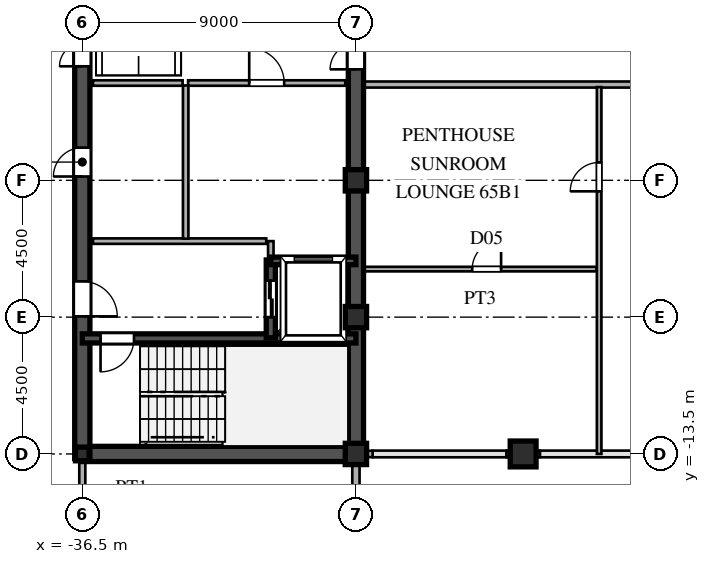
"""IFC4 building model, lengths in metres.
Left out: names, types, materials, properties, quantities, classifications, styles, units other than length and angle.
Written with IfcOpenShell. Run it as: python <this file> out.ifc"""

import sys

from ifc_helpers import new_model, si_unit, direction, frame, frame_2d, origin, origin_2d, place, context, subcontext, project, spatial, rectangle, hollow_rectangle, i_section, extrude, source, transform, mapped, element, fill, save


model = new_model("IFC4")
c1 = context("Model", 3, precision=1e-05, world=origin(), true_north=direction((0.0, 1.0)))
c2 = subcontext(c1, "Body", "Model", "MODEL_VIEW")
j1 = project(units=[si_unit("LENGTHUNIT", "METRE"), si_unit("PLANEANGLEUNIT", "RADIAN")], contexts=[c1])
p1 = place(None, origin())
s1 = spatial("IfcSite", under=j1, at=p1, CompositionType="ELEMENT")
p2 = place(p1, origin())
s2 = spatial("IfcBuilding", under=s1, at=p2, CompositionType="ELEMENT")
p3 = place(p2, frame((0.0, 0.0, 246.9)))
s3 = spatial("IfcBuildingStorey", under=s2, at=p3, CompositionType="ELEMENT", Elevation=246.9)
m1 = source(origin(), c2, "Body", "SweptSolid", [
    extrude(hollow_rectangle(XDim=0.7, YDim=0.7, WallThickness=0.03, at=origin_2d()), origin(), (0.0, 0.0, 1.0), 3.75),
])
for number, where, z_axis, x_axis in (
    (1, (-27.5, -13.5, 0.0), (0.0, 0.0, 1.0), (1.0, 0.0, 0.0)),
    (2, (-27.5, -9.0, 0.0), (0.0, 0.0, 1.0), (1.0, 0.0, 0.0)),
    (3, (-27.5, -4.5, 0.0), (0.0, 0.0, 1.0), (1.0, 0.0, 0.0)),
):
    element("IfcColumn", number, at=place(p3, frame(where, z_axis=z_axis, x_axis=x_axis)), inside=s3, PredefinedType="COLUMN", context=c2, shape_type="MappedRepresentation", body=[
        mapped(m1, transform((0.0, 0.0, 0.0), scale=1.0)),
    ])
m2 = source(origin(), c2, "Body", "SweptSolid", [
    extrude(i_section(OverallWidth=0.45, OverallDepth=0.45, WebThickness=0.016, FlangeThickness=0.025, at=origin_2d()), origin(), (0.0, 0.0, 1.0), 3.75),
])
p4 = place(p3, frame((-36.5, -13.5, 0.0), z_axis=(0.0, 0.0, 1.0), x_axis=(1.0, 0.0, 0.0)))
e4 = element("IfcColumn", 4, at=p4, inside=s3, PredefinedType="COLUMN", context=c2, shape_type="MappedRepresentation", body=[
    mapped(m2, transform((0.0, 0.0, 0.0), scale=1.0)),
])
m3 = source(origin(), c2, "Body", "SweptSolid", [
    extrude(hollow_rectangle(XDim=0.85, YDim=0.85, WallThickness=0.036, at=origin_2d()), origin(), (0.0, 0.0, 1.0), 3.75),
])
p5 = place(p3, frame((-22.0, -13.5, 0.0), z_axis=(0.0, 0.0, 1.0), x_axis=(1.0, 0.0, 0.0)))
e5 = element("IfcColumn", 5, at=p5, inside=s3, PredefinedType="COLUMN", context=c2, shape_type="MappedRepresentation", body=[
    mapped(m3, transform((0.0, 0.0, 0.0), scale=1.0)),
])
p6 = place(p3, frame((-27.5, -15.98, 0.0), z_axis=(0.0, 0.0, 1.0), x_axis=(0.0, 1.0, 0.0)))
e6 = element("IfcWall", 6, at=p6, inside=s3, PredefinedType="SOLIDWALL", context=c2, shape_type="SweptSolid", body=[
    extrude(rectangle(XDim=1.605, YDim=0.24, at=frame_2d((0.803, 0.0))), origin(), (0.0, 0.0, 1.0), 3.53),
])
p7 = place(p3, frame((-27.5, -14.375, 0.0), z_axis=(0.0, 0.0, 1.0), x_axis=(0.0, 1.0, 0.0)))
e7 = element("IfcWall", 7, at=p7, inside=s3, PredefinedType="SOLIDWALL", context=c2, shape_type="SweptSolid", body=[
    extrude(rectangle(XDim=0.62, YDim=0.24, at=frame_2d((0.31, 0.0))), origin(), (0.0, 0.0, 1.0), 3.03),
])
p8 = place(p3, frame((-27.49, -13.5, 0.0), z_axis=(0.0, 0.0, 1.0), x_axis=(1.0, 0.0, 0.0)))
e8 = element("IfcWall", 8, at=p8, inside=s3, PredefinedType="SOLIDWALL", context=c2, shape_type="SweptSolid", body=[
    extrude(rectangle(XDim=0.54, YDim=0.21, at=frame_2d((0.27, 0.0))), origin(), (0.0, 0.0, 1.0), 3.03),
])
p9 = place(p3, frame((-22.55, -13.5, 0.0), z_axis=(0.0, 0.0, 1.0), x_axis=(1.0, 0.0, 0.0)))
e9 = element("IfcWall", 9, at=p9, inside=s3, PredefinedType="SOLIDWALL", context=c2, shape_type="SweptSolid", body=[
    extrude(rectangle(XDim=1.1, YDim=0.21, at=frame_2d((0.55, 0.0))), origin(), (0.0, 0.0, 1.0), 3.03),
])
p10 = place(p3, frame((-27.5, -13.5, 0.0), z_axis=(0.0, 0.0, 1.0), x_axis=(0.0, 1.0, 0.0)))
e10 = element("IfcWall", 10, at=p10, inside=s3, PredefinedType="SHEAR", context=c2, shape_type="SweptSolid", body=[
    extrude(rectangle(XDim=12.2, YDim=0.5, at=frame_2d((6.1, 0.0))), origin(), (0.0, 0.0, 1.0), 3.53),
])
p11 = place(p3, frame((-27.5, -1.3, 0.0), z_axis=(0.0, 0.0, 1.0), x_axis=(0.0, 1.0, 0.0)))
e11 = element("IfcWall", 11, at=p11, inside=s3, PredefinedType="SHEAR", context=c2, shape_type="SweptSolid", body=[
    extrude(rectangle(XDim=2.6, YDim=0.5, at=frame_2d((1.3, 0.0))), origin(), (0.0, 0.0, 1.0), 3.53),
])
p12 = place(p11, frame((0.45, 0.0, 0.0)))
e12 = element("IfcOpeningElement", 12, at=p12, cuts=e11, PredefinedType="OPENING", context=c2, shape_type="SweptSolid", body=[
    extrude(rectangle(XDim=1.7, YDim=2.35, at=frame_2d((0.85, 1.175))), frame((0.0, 0.26, 0.0), z_axis=(0.0, -1.0, 0.0), x_axis=(1.0, 0.0, 0.0)), (0.0, 0.0, 1.0), 0.52),
])
p13 = place(p3, frame((-36.5, -13.5, 0.0), z_axis=(0.0, 0.0, 1.0), x_axis=(1.0, 0.0, 0.0)))
e13 = element("IfcWall", 13, at=p13, inside=s3, PredefinedType="SHEAR", context=c2, shape_type="SweptSolid", body=[
    extrude(rectangle(XDim=9.0, YDim=0.5, at=frame_2d((4.5, 0.0))), origin(), (0.0, 0.0, 1.0), 3.53),
])
p14 = place(p3, frame((-36.5, -13.65, 0.0), z_axis=(0.0, 0.0, 1.0), x_axis=(0.0, 1.0, 0.0)))
e14 = element("IfcWall", 14, at=p14, inside=s3, PredefinedType="SHEAR", context=c2, shape_type="SweptSolid", body=[
    extrude(rectangle(XDim=7.15, YDim=0.5, at=frame_2d((3.575, 0.0))), origin(), (0.0, 0.0, 1.0), 3.53),
])
p15 = place(p14, frame((4.675, 0.0, 0.0)))
e15 = element("IfcOpeningElement", 15, at=p15, cuts=e14, PredefinedType="OPENING", context=c2, shape_type="SweptSolid", body=[
    extrude(rectangle(XDim=1.15, YDim=2.2, at=frame_2d((0.575, 1.1))), frame((0.0, 0.26, 0.0), z_axis=(0.0, -1.0, 0.0), x_axis=(1.0, 0.0, 0.0)), (0.0, 0.0, 1.0), 0.52),
])
p16 = place(p3, frame((-36.5, -1.3, 0.0), z_axis=(0.0, 0.0, 1.0), x_axis=(0.0, 1.0, 0.0)))
e16 = element("IfcWall", 16, at=p16, inside=s3, PredefinedType="SHEAR", context=c2, shape_type="SweptSolid", body=[
    extrude(rectangle(XDim=2.6, YDim=0.5, at=frame_2d((1.3, 0.0))), origin(), (0.0, 0.0, 1.0), 3.53),
])
p17 = place(p16, frame((0.55, 0.0, 0.0)))
e17 = element("IfcOpeningElement", 17, at=p17, cuts=e16, PredefinedType="OPENING", context=c2, shape_type="SweptSolid", body=[
    extrude(rectangle(XDim=1.5, YDim=2.3, at=frame_2d((0.75, 1.15))), frame((0.0, 0.26, 0.0), z_axis=(0.0, -1.0, 0.0), x_axis=(1.0, 0.0, 0.0)), (0.0, 0.0, 1.0), 0.52),
])
p18 = place(p3, frame((-36.5, -6.5, 0.0), z_axis=(0.0, 0.0, 1.0), x_axis=(0.0, 1.0, 0.0)))
e18 = element("IfcWall", 18, at=p18, inside=s3, PredefinedType="SHEAR", context=c2, shape_type="SweptSolid", body=[
    extrude(rectangle(XDim=5.2, YDim=0.5, at=frame_2d((2.6, 0.0))), origin(), (0.0, 0.0, 1.0), 3.53),
])
p19 = place(p18, frame((2.125, 0.0, 0.0)))
e19 = element("IfcOpeningElement", 19, at=p19, cuts=e18, PredefinedType="OPENING", context=c2, shape_type="SweptSolid", body=[
    extrude(rectangle(XDim=0.95, YDim=2.15, at=frame_2d((0.475, 1.075))), frame((0.0, 0.26, 0.0), z_axis=(0.0, -1.0, 0.0), x_axis=(1.0, 0.0, 0.0)), (0.0, 0.0, 1.0), 0.52),
])
p20 = place(p3, frame((-36.5, -9.7, 0.0), z_axis=(0.0, 0.0, 1.0), x_axis=(1.0, 0.0, 0.0)))
e20 = element("IfcWall", 20, at=p20, inside=s3, PredefinedType="SHEAR", context=c2, shape_type="SweptSolid", body=[
    extrude(rectangle(XDim=9.0, YDim=0.3, at=frame_2d((4.5, 0.0))), origin(), (0.0, 0.0, 1.0), 3.53),
])
p21 = place(p20, frame((0.6, 0.0, 0.0)))
e21 = element("IfcOpeningElement", 21, at=p21, cuts=e20, PredefinedType="OPENING", context=c2, shape_type="SweptSolid", body=[
    extrude(rectangle(XDim=1.1, YDim=2.2, at=frame_2d((0.55, 1.1))), frame((0.0, 0.16, 0.0), z_axis=(0.0, -1.0, 0.0), x_axis=(1.0, 0.0, 0.0)), (0.0, 0.0, 1.0), 0.32),
])
p22 = place(p3, frame((-30.3, -7.15, 0.0), z_axis=(0.0, 0.0, 1.0), x_axis=(1.0, 0.0, 0.0)))
e22 = element("IfcWall", 22, at=p22, inside=s3, PredefinedType="SHEAR", context=c2, shape_type="SweptSolid", body=[
    extrude(rectangle(XDim=2.8, YDim=0.25, at=frame_2d((1.4, 0.0))), origin(), (0.0, 0.0, 1.0), 3.53),
])
p23 = place(p3, frame((-30.3, -9.68, 0.0), z_axis=(0.0, 0.0, 1.0), x_axis=(0.0, 1.0, 0.0)))
e23 = element("IfcWall", 23, at=p23, inside=s3, PredefinedType="SHEAR", context=c2, shape_type="SweptSolid", body=[
    extrude(rectangle(XDim=2.56, YDim=0.3, at=frame_2d((1.28, 0.0))), origin(), (0.0, 0.0, 1.0), 3.53),
])
p24 = place(p23, frame((0.68, 0.0, 0.0)))
e24 = element("IfcOpeningElement", 24, at=p24, cuts=e23, PredefinedType="OPENING", context=c2, shape_type="SweptSolid", body=[
    extrude(rectangle(XDim=1.2, YDim=2.25, at=frame_2d((0.6, 1.125))), frame((0.0, 0.16, 0.0), z_axis=(0.0, -1.0, 0.0), x_axis=(1.0, 0.0, 0.0)), (0.0, 0.0, 1.0), 0.32),
])
p25 = place(p3, frame((-36.15, -6.5, 0.0), z_axis=(0.0, 0.0, 1.0), x_axis=(1.0, 0.0, 0.0)))
e25 = element("IfcWall", 25, at=p25, inside=s3, PredefinedType="PARTITIONING", context=c2, shape_type="SweptSolid", body=[
    extrude(rectangle(XDim=5.7, YDim=0.18, at=frame_2d((2.85, 0.0))), origin(), (0.0, 0.0, 1.0), 3.53),
])
p26 = place(p3, frame((-30.3, -7.12, 0.0), z_axis=(0.0, 0.0, 1.0), x_axis=(0.0, 1.0, 0.0)))
e26 = element("IfcWall", 26, at=p26, inside=s3, PredefinedType="PARTITIONING", context=c2, shape_type="SweptSolid", body=[
    extrude(rectangle(XDim=0.62, YDim=0.18, at=frame_2d((0.31, 0.0))), origin(), (0.0, 0.0, 1.0), 3.53),
])
p27 = place(p3, frame((-33.1, -6.42, 0.0), z_axis=(0.0, 0.0, 1.0), x_axis=(0.0, 1.0, 0.0)))
e27 = element("IfcWall", 27, at=p27, inside=s3, PredefinedType="PARTITIONING", context=c2, shape_type="SweptSolid", body=[
    extrude(rectangle(XDim=5.04, YDim=0.18, at=frame_2d((2.52, 0.0))), origin(), (0.0, 0.0, 1.0), 3.53),
])
p28 = place(p3, frame((-33.02, -1.3, 0.0), z_axis=(0.0, 0.0, 1.0), x_axis=(1.0, 0.0, 0.0)))
e28 = element("IfcWall", 28, at=p28, inside=s3, PredefinedType="PARTITIONING", context=c2, shape_type="SweptSolid", body=[
    extrude(rectangle(XDim=5.17, YDim=0.18, at=frame_2d((2.585, 0.0))), origin(), (0.0, 0.0, 1.0), 3.53),
])
p29 = place(p28, frame((2.01, 0.0, 0.0)))
e29 = element("IfcOpeningElement", 29, at=p29, cuts=e28, PredefinedType="OPENING", context=c2, shape_type="SweptSolid", body=[
    extrude(rectangle(XDim=1.15, YDim=2.2, at=frame_2d((0.575, 1.1))), frame((0.0, 0.1, 0.0), z_axis=(0.0, -1.0, 0.0), x_axis=(1.0, 0.0, 0.0)), (0.0, 0.0, 1.0), 0.2),
])
p30 = place(p3, frame((-36.15, -1.3, 0.0), z_axis=(0.0, 0.0, 1.0), x_axis=(1.0, 0.0, 0.0)))
e30 = element("IfcWall", 30, at=p30, inside=s3, PredefinedType="PARTITIONING", context=c2, shape_type="SweptSolid", body=[
    extrude(rectangle(XDim=2.95, YDim=0.18, at=frame_2d((1.475, 0.0))), origin(), (0.0, 0.0, 1.0), 3.53),
])
p31 = place(p3, frame((-27.245, -7.42, 0.0), z_axis=(0.0, 0.0, 1.0), x_axis=(1.0, 0.0, 0.0)))
e31 = element("IfcWall", 31, at=p31, inside=s3, PredefinedType="PARTITIONING", context=c2, shape_type="SweptSolid", body=[
    extrude(rectangle(XDim=7.66, YDim=0.15, at=frame_2d((3.83, 0.0))), origin(), (0.0, 0.0, 1.0), 3.53),
])
p32 = place(p31, frame((3.57, 0.0, 0.0)))
e32 = element("IfcOpeningElement", 32, at=p32, cuts=e31, PredefinedType="OPENING", context=c2, shape_type="SweptSolid", body=[
    extrude(rectangle(XDim=0.95, YDim=2.15, at=frame_2d((0.475, 1.075))), frame((0.0, 0.085, 0.0), z_axis=(0.0, -1.0, 0.0), x_axis=(1.0, 0.0, 0.0)), (0.0, 0.0, 1.0), 0.17),
])
p33 = place(p3, frame((-27.245, -1.35, 0.0), z_axis=(0.0, 0.0, 1.0), x_axis=(1.0, 0.0, 0.0)))
e33 = element("IfcWall", 33, at=p33, inside=s3, PredefinedType="PARTITIONING", context=c2, shape_type="SweptSolid", body=[
    extrude(rectangle(XDim=54.49, YDim=0.2, at=frame_2d((27.245, 0.0))), origin(), (0.0, 0.0, 1.0), 3.53),
])
p34 = place(p33, frame((24.97, 0.0, 0.0)))
e34 = element("IfcOpeningElement", 34, at=p34, cuts=e33, PredefinedType="OPENING", context=c2, shape_type="SweptSolid", body=[
    extrude(rectangle(XDim=1.05, YDim=2.25, at=frame_2d((0.525, 1.125))), frame((0.0, 0.11, 0.0), z_axis=(0.0, -1.0, 0.0), x_axis=(1.0, 0.0, 0.0)), (0.0, 0.0, 1.0), 0.22),
])
p35 = place(p3, frame((-36.5, -15.515, 0.0), z_axis=(0.0, 0.0, 1.0), x_axis=(0.0, 1.0, 0.0)))
e35 = element("IfcWall", 35, at=p35, inside=s3, PredefinedType="PARTITIONING", context=c2, shape_type="SweptSolid", body=[
    extrude(rectangle(XDim=1.76, YDim=0.2, at=frame_2d((0.88, 0.0))), origin(), (0.0, 0.0, 1.0), 2.93),
])
p36 = place(p3, frame((-19.5, -13.5, 0.0), z_axis=(0.0, 0.0, 1.0), x_axis=(0.0, 1.0, 0.0)))
e36 = element("IfcWall", 36, at=p36, inside=s3, PredefinedType="PARTITIONING", context=c2, shape_type="SweptSolid", body=[
    extrude(rectangle(XDim=12.065, YDim=0.15, at=frame_2d((6.032, 0.0))), origin(), (0.0, 0.0, 1.0), 3.53),
])
p37 = place(p36, frame((8.637, 0.0, 0.0)))
e37 = element("IfcOpeningElement", 37, at=p37, cuts=e36, PredefinedType="OPENING", context=c2, shape_type="SweptSolid", body=[
    extrude(rectangle(XDim=0.95, YDim=2.15, at=frame_2d((0.475, 1.075))), frame((0.0, 0.085, 0.0), z_axis=(0.0, -1.0, 0.0), x_axis=(1.0, 0.0, 0.0)), (0.0, 0.0, 1.0), 0.17),
])
m4 = source(origin(), c2, "Body", "SweptSolid", [
    extrude(rectangle(XDim=1.7, YDim=2.35, at=frame_2d((0.85, 1.175))), frame((0.0, 0.025, 0.0), z_axis=(0.0, -1.0, 0.0), x_axis=(1.0, 0.0, 0.0)), (0.0, 0.0, 1.0), 0.05),
])
p38 = place(p12, origin())
e38 = element("IfcDoor", 38, at=p38, inside=s3, OperationType="DOUBLE_SWING_LEFT", PredefinedType="DOOR", context=c2, shape_type="MappedRepresentation", body=[
    mapped(m4, transform((0.0, 0.0, 0.0), scale=1.0)),
])
fill(e12, e38)
m5 = source(origin(), c2, "Body", "SweptSolid", [
    extrude(rectangle(XDim=1.15, YDim=2.2, at=frame_2d((0.575, 1.1))), frame((0.0, 0.025, 0.0), z_axis=(0.0, -1.0, 0.0), x_axis=(1.0, 0.0, 0.0)), (0.0, 0.0, 1.0), 0.05),
])
p39 = place(p15, frame((1.15, 0.0, 0.0), z_axis=(0.0, 0.0, 1.0), x_axis=(-1.0, 0.0, 0.0)))
e39 = element("IfcDoor", 39, at=p39, inside=s3, OperationType="SINGLE_SWING_LEFT", PredefinedType="DOOR", context=c2, shape_type="MappedRepresentation", body=[
    mapped(m5, transform((0.0, 0.0, 0.0), scale=1.0)),
])
fill(e15, e39)
m6 = source(origin(), c2, "Body", "SweptSolid", [
    extrude(rectangle(XDim=1.5, YDim=2.3, at=frame_2d((0.75, 1.15))), frame((0.0, 0.025, 0.0), z_axis=(0.0, -1.0, 0.0), x_axis=(1.0, 0.0, 0.0)), (0.0, 0.0, 1.0), 0.05),
])
p40 = place(p17, origin())
e40 = element("IfcDoor", 40, at=p40, inside=s3, OperationType="DOUBLE_SWING_LEFT", PredefinedType="DOOR", context=c2, shape_type="MappedRepresentation", body=[
    mapped(m6, transform((0.0, 0.0, 0.0), scale=1.0)),
])
fill(e17, e40)
m7 = source(origin(), c2, "Body", "SweptSolid", [
    extrude(rectangle(XDim=0.95, YDim=2.15, at=frame_2d((0.475, 1.075))), frame((0.0, 0.025, 0.0), z_axis=(0.0, -1.0, 0.0), x_axis=(1.0, 0.0, 0.0)), (0.0, 0.0, 1.0), 0.05),
])
p41 = place(p19, origin())
e41 = element("IfcDoor", 41, at=p41, inside=s3, OperationType="SINGLE_SWING_LEFT", PredefinedType="DOOR", context=c2, shape_type="MappedRepresentation", body=[
    mapped(m7, transform((0.0, 0.0, 0.0), scale=1.0)),
])
fill(e19, e41)
m8 = source(origin(), c2, "Body", "SweptSolid", [
    extrude(rectangle(XDim=1.1, YDim=2.2, at=frame_2d((0.55, 1.1))), frame((0.0, 0.025, 0.0), z_axis=(0.0, -1.0, 0.0), x_axis=(1.0, 0.0, 0.0)), (0.0, 0.0, 1.0), 0.05),
])
p42 = place(p21, frame((1.1, 0.0, 0.0), z_axis=(0.0, 0.0, 1.0), x_axis=(-1.0, 0.0, 0.0)))
e42 = element("IfcDoor", 42, at=p42, inside=s3, OperationType="SINGLE_SWING_LEFT", PredefinedType="DOOR", context=c2, shape_type="MappedRepresentation", body=[
    mapped(m8, transform((0.0, 0.0, 0.0), scale=1.0)),
])
fill(e21, e42)
m9 = source(origin(), c2, "Body", "SweptSolid", [
    extrude(rectangle(XDim=1.2, YDim=2.25, at=frame_2d((0.6, 1.125))), frame((0.0, 0.025, 0.0), z_axis=(0.0, -1.0, 0.0), x_axis=(1.0, 0.0, 0.0)), (0.0, 0.0, 1.0), 0.05),
])
p43 = place(p24, origin())
e43 = element("IfcDoor", 43, at=p43, inside=s3, OperationType="DOUBLE_DOOR_SLIDING", PredefinedType="DOOR", context=c2, shape_type="MappedRepresentation", body=[
    mapped(m9, transform((0.0, 0.0, 0.0), scale=1.0)),
])
fill(e24, e43)
p44 = place(p29, origin())
e44 = element("IfcDoor", 44, at=p44, inside=s3, OperationType="SINGLE_SWING_LEFT", PredefinedType="DOOR", context=c2, shape_type="MappedRepresentation", body=[
    mapped(m5, transform((0.0, 0.0, 0.0), scale=1.0)),
])
fill(e29, e44)
m10 = source(origin(), c2, "Body", "SweptSolid", [
    extrude(rectangle(XDim=0.95, YDim=2.15, at=frame_2d((0.475, 1.075))), frame((0.0, 0.025, 0.0), z_axis=(0.0, -1.0, 0.0), x_axis=(1.0, 0.0, 0.0)), (0.0, 0.0, 1.0), 0.05),
])
p45 = place(p32, origin())
e45 = element("IfcDoor", 45, at=p45, inside=s3, OperationType="SINGLE_SWING_RIGHT", PredefinedType="DOOR", context=c2, shape_type="MappedRepresentation", body=[
    mapped(m10, transform((0.0, 0.0, 0.0), scale=1.0)),
])
fill(e32, e45)
p46 = place(p37, origin())
e46 = element("IfcDoor", 46, at=p46, inside=s3, OperationType="SINGLE_SWING_LEFT", PredefinedType="DOOR", context=c2, shape_type="MappedRepresentation", body=[
    mapped(m10, transform((0.0, 0.0, 0.0), scale=1.0)),
])
fill(e37, e46)
save(model, sys.argv[1])
